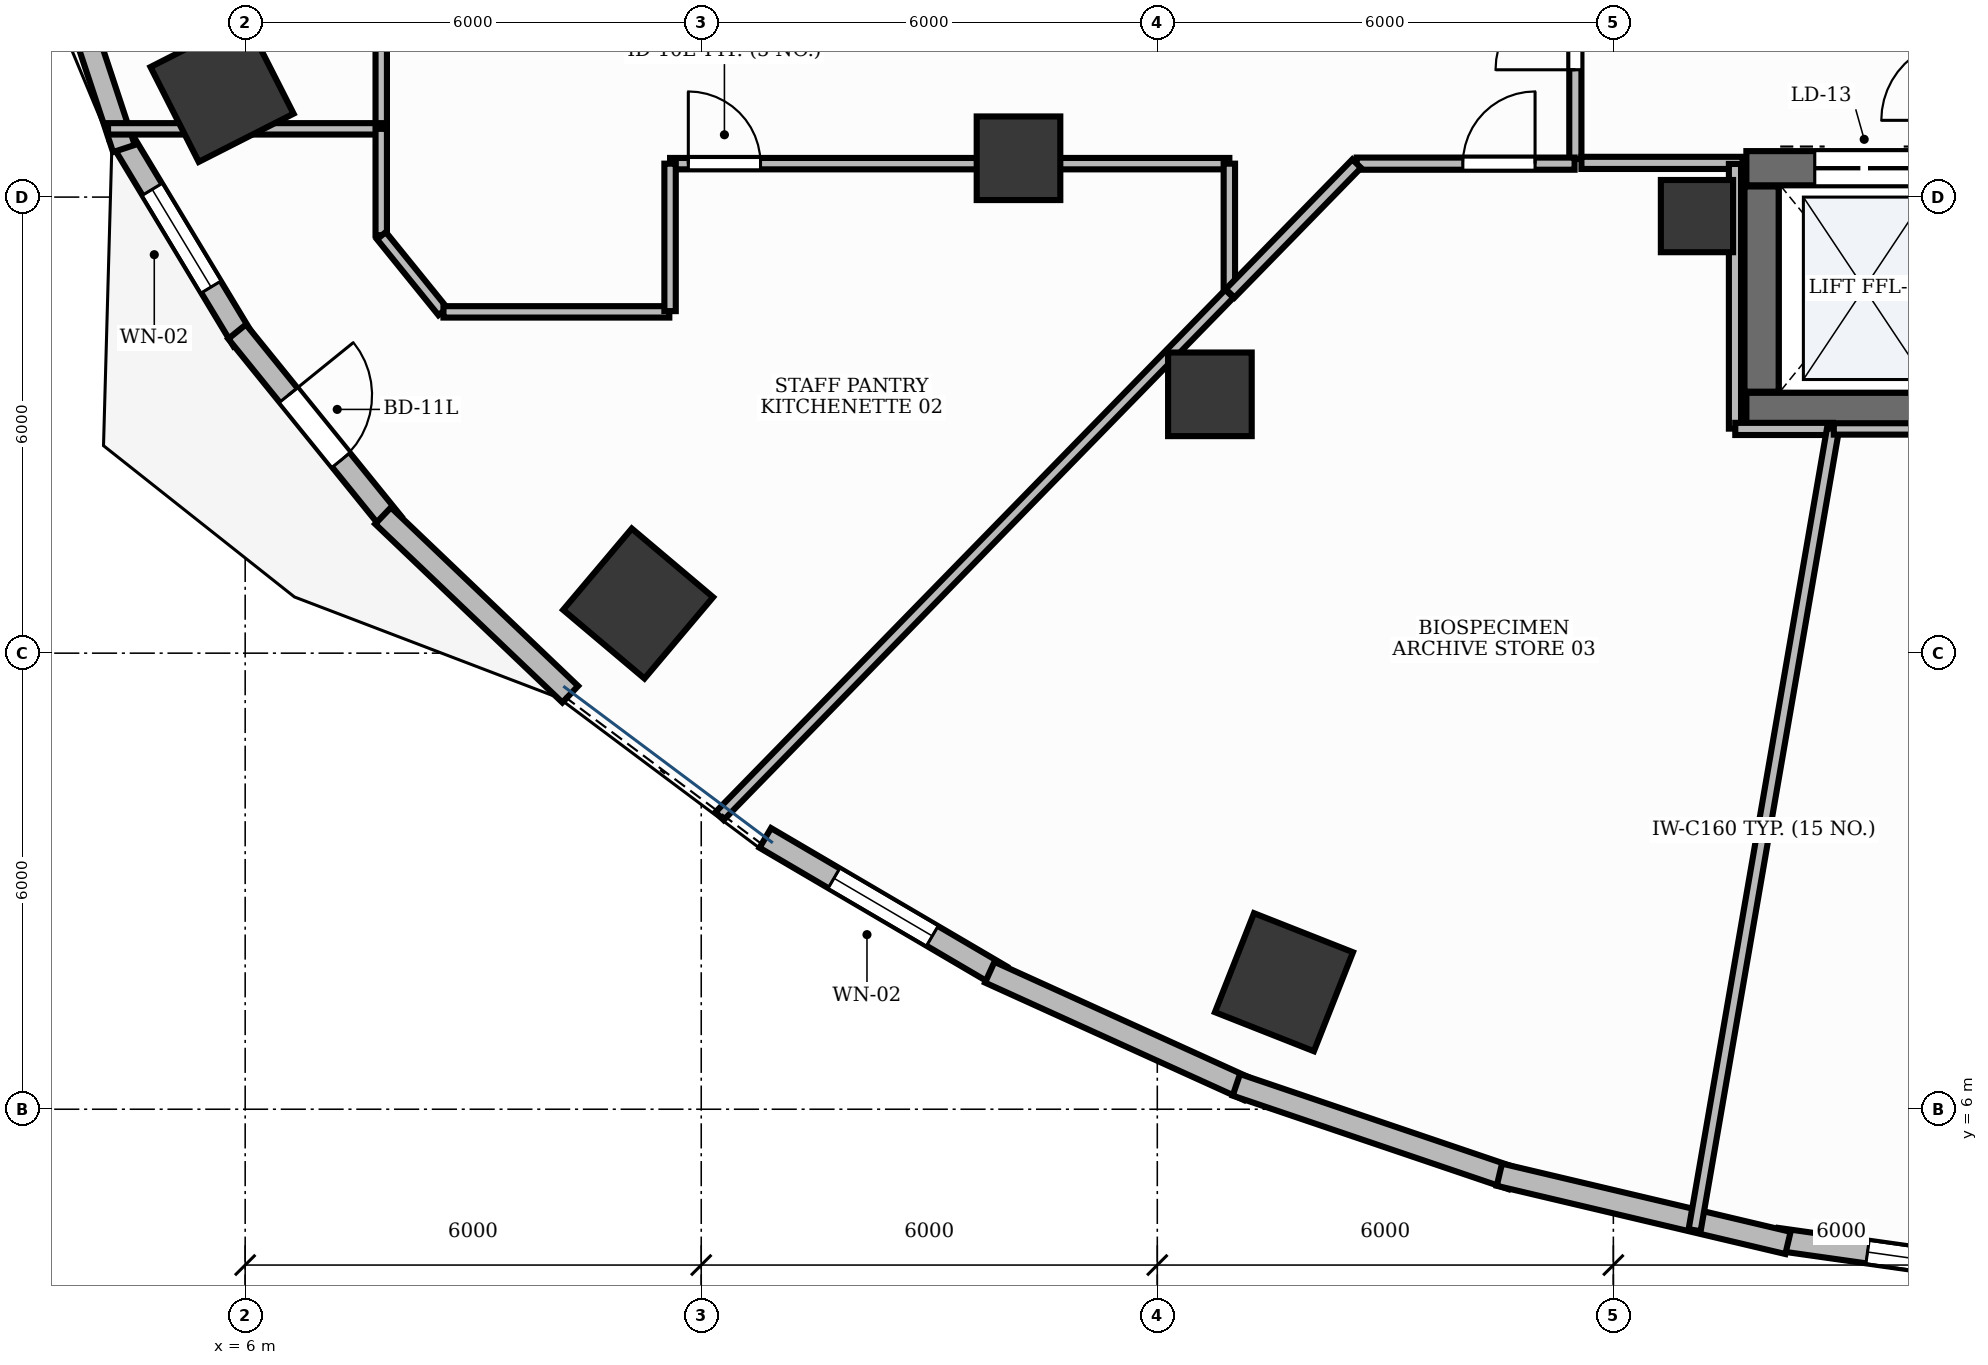
"""IFC4 building model, lengths in metres.
Left out: names, types, materials, properties, quantities, classifications, styles, units other than length and angle.
Written with IfcOpenShell. Run it as: python <this file> out.ifc"""

import sys

from ifc_helpers import new_model, si_unit, direction, frame, frame_2d, origin, origin_2d, place, context, subcontext, project, spatial, rectangle, extrude, element, fill, save


model = new_model("IFC4")
c1 = context("Model", 3, precision=1e-05, world=origin(), true_north=direction((0.0, 1.0)))
c2 = subcontext(c1, "Body", "Model", "MODEL_VIEW")
j1 = project(units=[si_unit("LENGTHUNIT", "METRE"), si_unit("PLANEANGLEUNIT", "RADIAN")], contexts=[c1])
p1 = place(None, origin())
s1 = spatial("IfcSite", under=j1, at=p1, CompositionType="ELEMENT")
p2 = place(p1, origin())
s2 = spatial("IfcBuilding", under=s1, at=p2, CompositionType="ELEMENT")
p3 = place(p2, frame((0.0, 0.0, 46.8)))
s3 = spatial("IfcBuildingStorey", under=s2, at=p3, CompositionType="ELEMENT", Elevation=46.8)
p4 = place(p3, frame((25.75, 15.2, 0.0), z_axis=(0.0, 0.0, 1.0), x_axis=(1.0, 0.0, 0.0)))
e1 = element("IfcWall", 1, at=p4, inside=s3, PredefinedType="SHEAR", context=c2, shape_type="SweptSolid", body=[
    extrude(rectangle(XDim=3.1, YDim=0.45, at=frame_2d((1.55, 0.0))), origin(), (0.0, 0.0, 1.0), 3.9),
])
p5 = place(p3, frame((25.75, 18.38, 0.0), z_axis=(0.0, 0.0, 1.0), x_axis=(1.0, 0.0, 0.0)))
e2 = element("IfcWall", 2, at=p5, inside=s3, PredefinedType="SHEAR", context=c2, shape_type="SweptSolid", body=[
    extrude(rectangle(XDim=3.1, YDim=0.45, at=frame_2d((1.55, 0.0))), origin(), (0.0, 0.0, 1.0), 3.9),
])
p6 = place(p5, frame((0.9, 0.0, 0.0)))
e3 = element("IfcOpeningElement", 3, at=p6, cuts=e2, PredefinedType="OPENING", context=c2, shape_type="SweptSolid", body=[
    extrude(rectangle(XDim=1.3, YDim=2.2, at=frame_2d((0.65, 1.1))), frame((0.0, 0.24, 0.0), z_axis=(0.0, -1.0, 0.0), x_axis=(1.0, 0.0, 0.0)), (0.0, 0.0, 1.0), 0.48),
])
p7 = place(p3, frame((25.95, 15.44, 0.0), z_axis=(0.0, 0.0, 1.0), x_axis=(0.0, 1.0, 0.0)))
e4 = element("IfcWall", 4, at=p7, inside=s3, PredefinedType="SHEAR", context=c2, shape_type="SweptSolid", body=[
    extrude(rectangle(XDim=2.7, YDim=0.45, at=frame_2d((1.35, 0.0))), origin(), (0.0, 0.0, 1.0), 3.9),
])
p8 = place(p3, frame((25.1, 17.75, -0.0), z_axis=(0.0, 0.0, 1.0), x_axis=(1.0, 0.0, 0.0)))
e5 = element("IfcColumn", 5, at=p8, inside=s3, PredefinedType="PILASTER", context=c2, shape_type="SweptSolid", body=[
    extrude(rectangle(XDim=0.95, YDim=0.95, at=origin_2d()), origin(), (0.0, 0.0, 1.0), 3.901),
])
p9 = place(p3, frame((5.696, 19.404, -0.0), z_axis=(0.0, 0.0, 1.0), x_axis=(-0.453057191132, 0.891481453292, 0.0)))
e6 = element("IfcColumn", 6, at=p9, inside=s3, PredefinedType="COLUMN", context=c2, shape_type="SweptSolid", body=[
    extrude(rectangle(XDim=1.4, YDim=1.4, at=origin_2d()), origin(), (0.0, 0.0, 1.0), 3.901),
])
p10 = place(p3, frame((16.174, 18.511, -0.0), z_axis=(0.0, 0.0, 1.0), x_axis=(1.0, 0.0, 0.0)))
e7 = element("IfcColumn", 7, at=p10, inside=s3, PredefinedType="COLUMN", context=c2, shape_type="SweptSolid", body=[
    extrude(rectangle(XDim=1.1, YDim=1.1, at=origin_2d()), origin(), (0.0, 0.0, 1.0), 3.901),
])
p11 = place(p3, frame((11.17, 12.653, -0.0), z_axis=(0.0, 0.0, 1.0), x_axis=(-0.764246456939, 0.644924300253, 0.0)))
e8 = element("IfcColumn", 8, at=p11, inside=s3, PredefinedType="COLUMN", context=c2, shape_type="SweptSolid", body=[
    extrude(rectangle(XDim=1.4, YDim=1.4, at=origin_2d()), origin(), (0.0, 0.0, 1.0), 3.901),
])
p12 = place(p3, frame((18.692, 15.405, -0.0), z_axis=(0.0, 0.0, 1.0), x_axis=(1.0, 0.0, 0.0)))
e9 = element("IfcColumn", 9, at=p12, inside=s3, PredefinedType="COLUMN", context=c2, shape_type="SweptSolid", body=[
    extrude(rectangle(XDim=1.1, YDim=1.1, at=origin_2d()), origin(), (0.0, 0.0, 1.0), 3.901),
])
p13 = place(p3, frame((19.667, 7.671, -0.0), z_axis=(0.0, 0.0, 1.0), x_axis=(-0.930225540858, 0.366988341962, 0.0)))
e10 = element("IfcColumn", 10, at=p13, inside=s3, PredefinedType="COLUMN", context=c2, shape_type="SweptSolid", body=[
    extrude(rectangle(XDim=1.4, YDim=1.4, at=origin_2d()), origin(), (0.0, 0.0, 1.0), 3.901),
])
p14 = place(p3, frame((4.352, 18.805, 0.0), z_axis=(0.0, 0.0, 1.0), x_axis=(0.516447962267, -0.856318575222, 0.0)))
e11 = element("IfcWall", 11, at=p14, inside=s3, PredefinedType="STANDARD", context=c2, shape_type="SweptSolid", body=[
    extrude(rectangle(XDim=3.143, YDim=0.3, at=frame_2d((1.571, 0.0))), origin(), (0.0, 0.0, 1.0), 3.9),
])
p15 = place(p14, frame((0.821, 0.0, 0.95)))
e12 = element("IfcOpeningElement", 12, at=p15, cuts=e11, PredefinedType="OPENING", context=c2, shape_type="SweptSolid", body=[
    extrude(rectangle(XDim=1.5, YDim=1.8, at=frame_2d((0.75, 0.9))), frame((0.0, 0.165, 0.0), z_axis=(0.0, -1.0, 0.0), x_axis=(1.0, 0.0, 0.0)), (0.0, 0.0, 1.0), 0.33),
])
p16 = place(p3, frame((5.894, 16.23, 0.0), z_axis=(0.0, 0.0, 1.0), x_axis=(0.629295540187, -0.777166084631, 0.0)))
e13 = element("IfcWall", 13, at=p16, inside=s3, PredefinedType="STANDARD", context=c2, shape_type="SweptSolid", body=[
    extrude(rectangle(XDim=3.248, YDim=0.3, at=frame_2d((1.624, 0.0))), origin(), (0.0, 0.0, 1.0), 3.9),
])
p17 = place(p16, frame((1.074, 0.0, 0.0)))
e14 = element("IfcOpeningElement", 14, at=p17, cuts=e13, PredefinedType="OPENING", context=c2, shape_type="SweptSolid", body=[
    extrude(rectangle(XDim=1.1, YDim=2.15, at=frame_2d((0.55, 1.075))), frame((0.0, 0.165, 0.0), z_axis=(0.0, -1.0, 0.0), x_axis=(1.0, 0.0, 0.0)), (0.0, 0.0, 1.0), 0.33),
])
p18 = place(p3, frame((12.843, 9.569, 0.0), z_axis=(0.0, 0.0, 1.0), x_axis=(0.862473134325, -0.506102847817, 0.0)))
e15 = element("IfcWall", 15, at=p18, inside=s3, PredefinedType="STANDARD", context=c2, shape_type="SweptSolid", body=[
    extrude(rectangle(XDim=3.595, YDim=0.3, at=frame_2d((1.798, 0.0))), origin(), (0.0, 0.0, 1.0), 3.9),
])
p19 = place(p18, frame((1.048, 0.0, 0.95)))
e16 = element("IfcOpeningElement", 16, at=p19, cuts=e15, PredefinedType="OPENING", context=c2, shape_type="SweptSolid", body=[
    extrude(rectangle(XDim=1.5, YDim=1.8, at=frame_2d((0.75, 0.9))), frame((0.0, 0.165, 0.0), z_axis=(0.0, -1.0, 0.0), x_axis=(1.0, 0.0, 0.0)), (0.0, 0.0, 1.0), 0.33),
])
p20 = place(p3, frame((26.15, 4.29, 0.0), z_axis=(0.0, 0.0, 1.0), x_axis=(0.990165573956, -0.139900450869, 0.0)))
e17 = element("IfcWall", 17, at=p20, inside=s3, PredefinedType="STANDARD", context=c2, shape_type="SweptSolid", body=[
    extrude(rectangle(XDim=3.911, YDim=0.3, at=frame_2d((1.956, 0.0))), origin(), (0.0, 0.0, 1.0), 3.9),
])
p21 = place(p20, frame((1.206, 0.0, 0.95)))
e18 = element("IfcOpeningElement", 18, at=p21, cuts=e17, PredefinedType="OPENING", context=c2, shape_type="SweptSolid", body=[
    extrude(rectangle(XDim=1.5, YDim=1.8, at=frame_2d((0.75, 0.9))), frame((0.0, 0.165, 0.0), z_axis=(0.0, -1.0, 0.0), x_axis=(1.0, 0.0, 0.0)), (0.0, 0.0, 1.0), 0.33),
])
p22 = place(p3, frame((2.537, 24.289, 0.0), z_axis=(0.0, 0.0, 1.0), x_axis=(0.31372816724, -0.949512841978, 0.0)))
e19 = element("IfcWall", 19, at=p22, inside=s3, PredefinedType="STANDARD", context=c2, shape_type="SweptSolid", body=[
    extrude(rectangle(XDim=5.951, YDim=0.3, at=frame_2d((2.976, 0.0))), origin(), (0.0, 0.0, 1.0), 3.9),
])
p23 = place(p3, frame((7.814, 13.808, 0.0), z_axis=(0.0, 0.0, 1.0), x_axis=(0.72369587847, -0.69011902994, 0.0)))
e20 = element("IfcWall", 20, at=p23, inside=s3, PredefinedType="STANDARD", context=c2, shape_type="SweptSolid", body=[
    extrude(rectangle(XDim=3.403, YDim=0.3, at=frame_2d((1.701, 0.0))), origin(), (0.0, 0.0, 1.0), 3.9),
])
p24 = place(p3, frame((15.796, 7.802, 0.0), z_axis=(0.0, 0.0, 1.0), x_axis=(0.910623406862, -0.413237233166, 0.0)))
e21 = element("IfcWall", 21, at=p24, inside=s3, PredefinedType="STANDARD", context=c2, shape_type="SweptSolid", body=[
    extrude(rectangle(XDim=3.74, YDim=0.3, at=frame_2d((1.87, 0.0))), origin(), (0.0, 0.0, 1.0), 3.47),
])
p25 = place(p3, frame((19.04, 6.321, 0.0), z_axis=(0.0, 0.0, 1.0), x_axis=(0.94702579403, -0.321157508773, 0.0)))
e22 = element("IfcWall", 22, at=p25, inside=s3, PredefinedType="STANDARD", context=c2, shape_type="SweptSolid", body=[
    extrude(rectangle(XDim=3.83, YDim=0.3, at=frame_2d((1.915, 0.0))), origin(), (0.0, 0.0, 1.0), 3.9),
])
p26 = place(p3, frame((22.5, 5.138, 0.0), z_axis=(0.0, 0.0, 1.0), x_axis=(0.973197600754, -0.229970497863, 0.0)))
e23 = element("IfcWall", 23, at=p26, inside=s3, PredefinedType="STANDARD", context=c2, shape_type="SweptSolid", body=[
    extrude(rectangle(XDim=3.901, YDim=0.3, at=frame_2d((1.951, 0.0))), origin(), (0.0, 0.0, 1.0), 3.9),
])
p27 = place(p3, frame((23.5, 18.5, 0.0), z_axis=(0.0, 0.0, 1.0), x_axis=(0.0, 1.0, 0.0)))
e24 = element("IfcWall", 24, at=p27, inside=s3, PredefinedType="PARTITIONING", context=c2, shape_type="SweptSolid", body=[
    extrude(rectangle(XDim=3.4, YDim=0.16, at=frame_2d((1.7, 0.0))), origin(), (0.0, 0.0, 1.0), 2.91),
])
p28 = place(p27, frame((1.175, 0.0, 0.0)))
e25 = element("IfcOpeningElement", 25, at=p28, cuts=e24, PredefinedType="OPENING", context=c2, shape_type="SweptSolid", body=[
    extrude(rectangle(XDim=1.05, YDim=2.15, at=frame_2d((0.525, 1.075))), frame((0.0, 0.095, 0.0), z_axis=(0.0, -1.0, 0.0), x_axis=(1.0, 0.0, 0.0)), (0.0, 0.0, 1.0), 0.19),
])
p29 = place(p3, frame((23.58, 18.45, 0.0), z_axis=(0.0, 0.0, 1.0), x_axis=(1.0, 0.0, 0.0)))
e26 = element("IfcWall", 26, at=p29, inside=s3, PredefinedType="PARTITIONING", context=c2, shape_type="SweptSolid", body=[
    extrude(rectangle(XDim=2.12, YDim=0.16, at=frame_2d((1.06, 0.0))), origin(), (0.0, 0.0, 1.0), 2.91),
])
p30 = place(p3, frame((11.59, 18.44, 0.0), z_axis=(0.0, 0.0, 1.0), x_axis=(1.0, 0.0, 0.0)))
e27 = element("IfcWall", 27, at=p30, inside=s3, PredefinedType="PARTITIONING", context=c2, shape_type="SweptSolid", body=[
    extrude(rectangle(XDim=7.358, YDim=0.15, at=frame_2d((3.679, 0.0))), origin(), (0.0, 0.0, 1.0), 2.91),
])
p31 = place(p30, frame((0.24, 0.0, 0.0)))
e28 = element("IfcOpeningElement", 28, at=p31, cuts=e27, PredefinedType="OPENING", context=c2, shape_type="SweptSolid", body=[
    extrude(rectangle(XDim=0.95, YDim=2.15, at=frame_2d((0.475, 1.075))), frame((0.0, 0.09, 0.0), z_axis=(0.0, -1.0, 0.0), x_axis=(1.0, 0.0, 0.0)), (0.0, 0.0, 1.0), 0.18),
])
p32 = place(p3, frame((20.623, 18.44, 0.0), z_axis=(0.0, 0.0, 1.0), x_axis=(1.0, 0.0, 0.0)))
e29 = element("IfcWall", 29, at=p32, inside=s3, PredefinedType="PARTITIONING", context=c2, shape_type="SweptSolid", body=[
    extrude(rectangle(XDim=2.867, YDim=0.16, at=frame_2d((1.434, 0.0))), origin(), (0.0, 0.0, 1.0), 2.91),
])
p33 = place(p32, frame((1.397, 0.0, 0.0)))
e30 = element("IfcOpeningElement", 30, at=p33, cuts=e29, PredefinedType="OPENING", context=c2, shape_type="SweptSolid", body=[
    extrude(rectangle(XDim=0.95, YDim=2.15, at=frame_2d((0.475, 1.075))), frame((0.0, 0.095, 0.0), z_axis=(0.0, -1.0, 0.0), x_axis=(1.0, 0.0, 0.0)), (0.0, 0.0, 1.0), 0.19),
])
p34 = place(p3, frame((7.79, 36.501, 0.0), z_axis=(0.0, 0.0, 1.0), x_axis=(0.0, -1.0, 0.0)))
e31 = element("IfcWall", 31, at=p34, inside=s3, PredefinedType="PARTITIONING", context=c2, shape_type="SweptSolid", body=[
    extrude(rectangle(XDim=17.593, YDim=0.15, at=frame_2d((8.797, 0.0))), origin(), (0.0, 0.0, 1.0), 2.91),
])
p35 = place(p34, frame((5.139, 0.0, 0.0)))
e32 = element("IfcOpeningElement", 32, at=p35, cuts=e31, PredefinedType="OPENING", context=c2, shape_type="SweptSolid", body=[
    extrude(rectangle(XDim=0.95, YDim=2.15, at=frame_2d((0.475, 1.075))), frame((0.0, 0.09, 0.0), z_axis=(0.0, -1.0, 0.0), x_axis=(1.0, 0.0, 0.0)), (0.0, 0.0, 1.0), 0.18),
])
p36 = place(p3, frame((4.196, 18.898, 0.0), z_axis=(0.0, 0.0, 1.0), x_axis=(1.0, 0.0, 0.0)))
e33 = element("IfcWall", 33, at=p36, inside=s3, PredefinedType="PARTITIONING", context=c2, shape_type="SweptSolid", body=[
    extrude(rectangle(XDim=3.594, YDim=0.15, at=frame_2d((1.797, 0.0))), origin(), (0.0, 0.0, 1.0), 2.91),
])
p37 = place(p3, frame((7.79, 18.898, 0.0), z_axis=(0.0, 0.0, 1.0), x_axis=(0.0, -1.0, 0.0)))
e34 = element("IfcWall", 34, at=p37, inside=s3, PredefinedType="PARTITIONING", context=c2, shape_type="SweptSolid", body=[
    extrude(rectangle(XDim=1.399, YDim=0.15, at=frame_2d((0.7, 0.0))), origin(), (0.0, 0.0, 1.0), 2.91),
])
p38 = place(p3, frame((7.792, 17.492, 0.0), z_axis=(0.0, 0.0, 1.0), x_axis=(0.629225554682, -0.777222748854, 0.0)))
e35 = element("IfcWall", 35, at=p38, inside=s3, PredefinedType="PARTITIONING", context=c2, shape_type="SweptSolid", body=[
    extrude(rectangle(XDim=1.285, YDim=0.15, at=frame_2d((0.643, 0.0))), origin(), (0.0, 0.0, 1.0), 2.91),
])
p39 = place(p3, frame((8.609, 16.49, 0.0), z_axis=(0.0, 0.0, 1.0), x_axis=(1.0, 0.0, 0.0)))
e36 = element("IfcWall", 36, at=p39, inside=s3, PredefinedType="PARTITIONING", context=c2, shape_type="SweptSolid", body=[
    extrude(rectangle(XDim=2.971, YDim=0.15, at=frame_2d((1.486, 0.0))), origin(), (0.0, 0.0, 1.0), 2.91),
])
p40 = place(p3, frame((11.59, 16.5, 0.0), z_axis=(0.0, 0.0, 1.0), x_axis=(0.0, 1.0, 0.0)))
e37 = element("IfcWall", 37, at=p40, inside=s3, PredefinedType="PARTITIONING", context=c2, shape_type="SweptSolid", body=[
    extrude(rectangle(XDim=1.94, YDim=0.15, at=frame_2d((0.97, 0.0))), origin(), (0.0, 0.0, 1.0), 2.91),
])
p41 = place(p3, frame((18.948, 18.44, 0.0), z_axis=(0.0, 0.0, 1.0), x_axis=(0.0, -1.0, 0.0)))
e38 = element("IfcWall", 38, at=p41, inside=s3, PredefinedType="PARTITIONING", context=c2, shape_type="SweptSolid", body=[
    extrude(rectangle(XDim=1.711, YDim=0.15, at=frame_2d((0.855, 0.0))), origin(), (0.0, 0.0, 1.0), 2.91),
])
p42 = place(p3, frame((18.948, 16.729, 0.0), z_axis=(0.0, 0.0, 1.0), x_axis=(-0.698422651091, -0.715685545783, 0.0)))
e39 = element("IfcWall", 39, at=p42, inside=s3, PredefinedType="PARTITIONING", context=c2, shape_type="SweptSolid", body=[
    extrude(rectangle(XDim=9.603, YDim=0.15, at=frame_2d((4.801, 0.0))), origin(), (0.0, 0.0, 1.0), 2.91),
])
p43 = place(p3, frame((25.6, 18.436, 0.0), z_axis=(0.0, 0.0, 1.0), x_axis=(0.0, -1.0, 0.0)))
e40 = element("IfcWall", 40, at=p43, inside=s3, PredefinedType="PARTITIONING", context=c2, shape_type="SweptSolid", body=[
    extrude(rectangle(XDim=3.482, YDim=0.16, at=frame_2d((1.741, 0.0))), origin(), (0.0, 0.0, 1.0), 2.91),
])
p44 = place(p3, frame((25.604, 14.95, 0.0), z_axis=(0.0, 0.0, 1.0), x_axis=(1.0, 0.0, 0.0)))
e41 = element("IfcWall", 41, at=p44, inside=s3, PredefinedType="PARTITIONING", context=c2, shape_type="SweptSolid", body=[
    extrude(rectangle(XDim=1.286, YDim=0.16, at=frame_2d((0.643, 0.0))), origin(), (0.0, 0.0, 1.0), 2.91),
])
p45 = place(p3, frame((26.89, 14.95, 0.0), z_axis=(0.0, 0.0, 1.0), x_axis=(-0.170210321413, -0.985407756456, 0.0)))
e42 = element("IfcWall", 42, at=p45, inside=s3, PredefinedType="PARTITIONING", context=c2, shape_type="SweptSolid", body=[
    extrude(rectangle(XDim=10.697, YDim=0.16, at=frame_2d((5.349, 0.0))), origin(), (0.0, 0.0, 1.0), 2.91),
])
p46 = place(p3, frame((18.958, 16.734, 0.0), z_axis=(0.0, 0.0, 1.0), x_axis=(0.698451817259, 0.715657081966, 0.0)))
e43 = element("IfcWall", 43, at=p46, inside=s3, PredefinedType="PARTITIONING", context=c2, shape_type="SweptSolid", body=[
    extrude(rectangle(XDim=2.384, YDim=0.16, at=frame_2d((1.192, 0.0))), origin(), (0.0, 0.0, 1.0), 2.91),
])
p47 = place(p3, frame((26.9, 14.95, 0.0), z_axis=(0.0, 0.0, 1.0), x_axis=(1.0, 0.0, 0.0)))
e44 = element("IfcWall", 44, at=p47, inside=s3, PredefinedType="PARTITIONING", context=c2, shape_type="SweptSolid", body=[
    extrude(rectangle(XDim=2.096, YDim=0.15, at=frame_2d((1.048, 0.0))), origin(), (0.0, 0.0, 1.0), 2.91),
])
p48 = place(p15, origin())
e45 = element("IfcWindow", 45, at=p48, inside=s3, PartitioningType="DOUBLE_PANEL_VERTICAL", PredefinedType="WINDOW", context=c2, shape_type="SweptSolid", body=[
    extrude(rectangle(XDim=1.5, YDim=1.8, at=frame_2d((0.75, 0.9))), frame((0.0, 0.03, 0.0), z_axis=(0.0, -1.0, 0.0), x_axis=(1.0, 0.0, 0.0)), (0.0, 0.0, 1.0), 0.06),
])
fill(e12, e45)
p49 = place(p17, origin())
e46 = element("IfcDoor", 46, at=p49, inside=s3, OperationType="SINGLE_SWING_LEFT", PredefinedType="DOOR", context=c2, shape_type="SweptSolid", body=[
    extrude(rectangle(XDim=1.1, YDim=2.15, at=frame_2d((0.55, 1.075))), frame((0.0, 0.025, 0.0), z_axis=(0.0, -1.0, 0.0), x_axis=(1.0, 0.0, 0.0)), (0.0, 0.0, 1.0), 0.05),
])
fill(e14, e46)
p50 = place(p19, origin())
e47 = element("IfcWindow", 47, at=p50, inside=s3, PartitioningType="DOUBLE_PANEL_VERTICAL", PredefinedType="WINDOW", context=c2, shape_type="SweptSolid", body=[
    extrude(rectangle(XDim=1.5, YDim=1.8, at=frame_2d((0.75, 0.9))), frame((0.0, 0.03, 0.0), z_axis=(0.0, -1.0, 0.0), x_axis=(1.0, 0.0, 0.0)), (0.0, 0.0, 1.0), 0.06),
])
fill(e16, e47)
p51 = place(p21, origin())
e48 = element("IfcWindow", 48, at=p51, inside=s3, PartitioningType="DOUBLE_PANEL_VERTICAL", PredefinedType="WINDOW", context=c2, shape_type="SweptSolid", body=[
    extrude(rectangle(XDim=1.5, YDim=1.8, at=frame_2d((0.75, 0.9))), frame((0.0, 0.03, 0.0), z_axis=(0.0, -1.0, 0.0), x_axis=(1.0, 0.0, 0.0)), (0.0, 0.0, 1.0), 0.06),
])
fill(e18, e48)
p52 = place(p6, origin())
e49 = element("IfcDoor", 49, at=p52, inside=s3, OperationType="DOUBLE_DOOR_SLIDING", PredefinedType="DOOR", context=c2, shape_type="SweptSolid", body=[
    extrude(rectangle(XDim=1.3, YDim=2.2, at=frame_2d((0.65, 1.1))), frame((0.0, 0.025, 0.0), z_axis=(0.0, -1.0, 0.0), x_axis=(1.0, 0.0, 0.0)), (0.0, 0.0, 1.0), 0.05),
])
fill(e3, e49)
p53 = place(p28, origin())
e50 = element("IfcDoor", 50, at=p53, inside=s3, OperationType="SINGLE_SWING_LEFT", PredefinedType="DOOR", context=c2, shape_type="SweptSolid", body=[
    extrude(rectangle(XDim=1.05, YDim=2.15, at=frame_2d((0.525, 1.075))), frame((0.0, 0.025, 0.0), z_axis=(0.0, -1.0, 0.0), x_axis=(1.0, 0.0, 0.0)), (0.0, 0.0, 1.0), 0.05),
])
fill(e25, e50)
p54 = place(p31, origin())
e51 = element("IfcDoor", 51, at=p54, inside=s3, OperationType="SINGLE_SWING_LEFT", PredefinedType="DOOR", context=c2, shape_type="SweptSolid", body=[
    extrude(rectangle(XDim=0.95, YDim=2.15, at=frame_2d((0.475, 1.075))), frame((0.0, 0.025, 0.0), z_axis=(0.0, -1.0, 0.0), x_axis=(1.0, 0.0, 0.0)), (0.0, 0.0, 1.0), 0.05),
])
fill(e28, e51)
p55 = place(p33, origin())
e52 = element("IfcDoor", 52, at=p55, inside=s3, OperationType="SINGLE_SWING_RIGHT", PredefinedType="DOOR", context=c2, shape_type="SweptSolid", body=[
    extrude(rectangle(XDim=0.95, YDim=2.15, at=frame_2d((0.475, 1.075))), frame((0.0, 0.025, 0.0), z_axis=(0.0, -1.0, 0.0), x_axis=(1.0, 0.0, 0.0)), (0.0, 0.0, 1.0), 0.05),
])
fill(e30, e52)
save(model, sys.argv[1])
